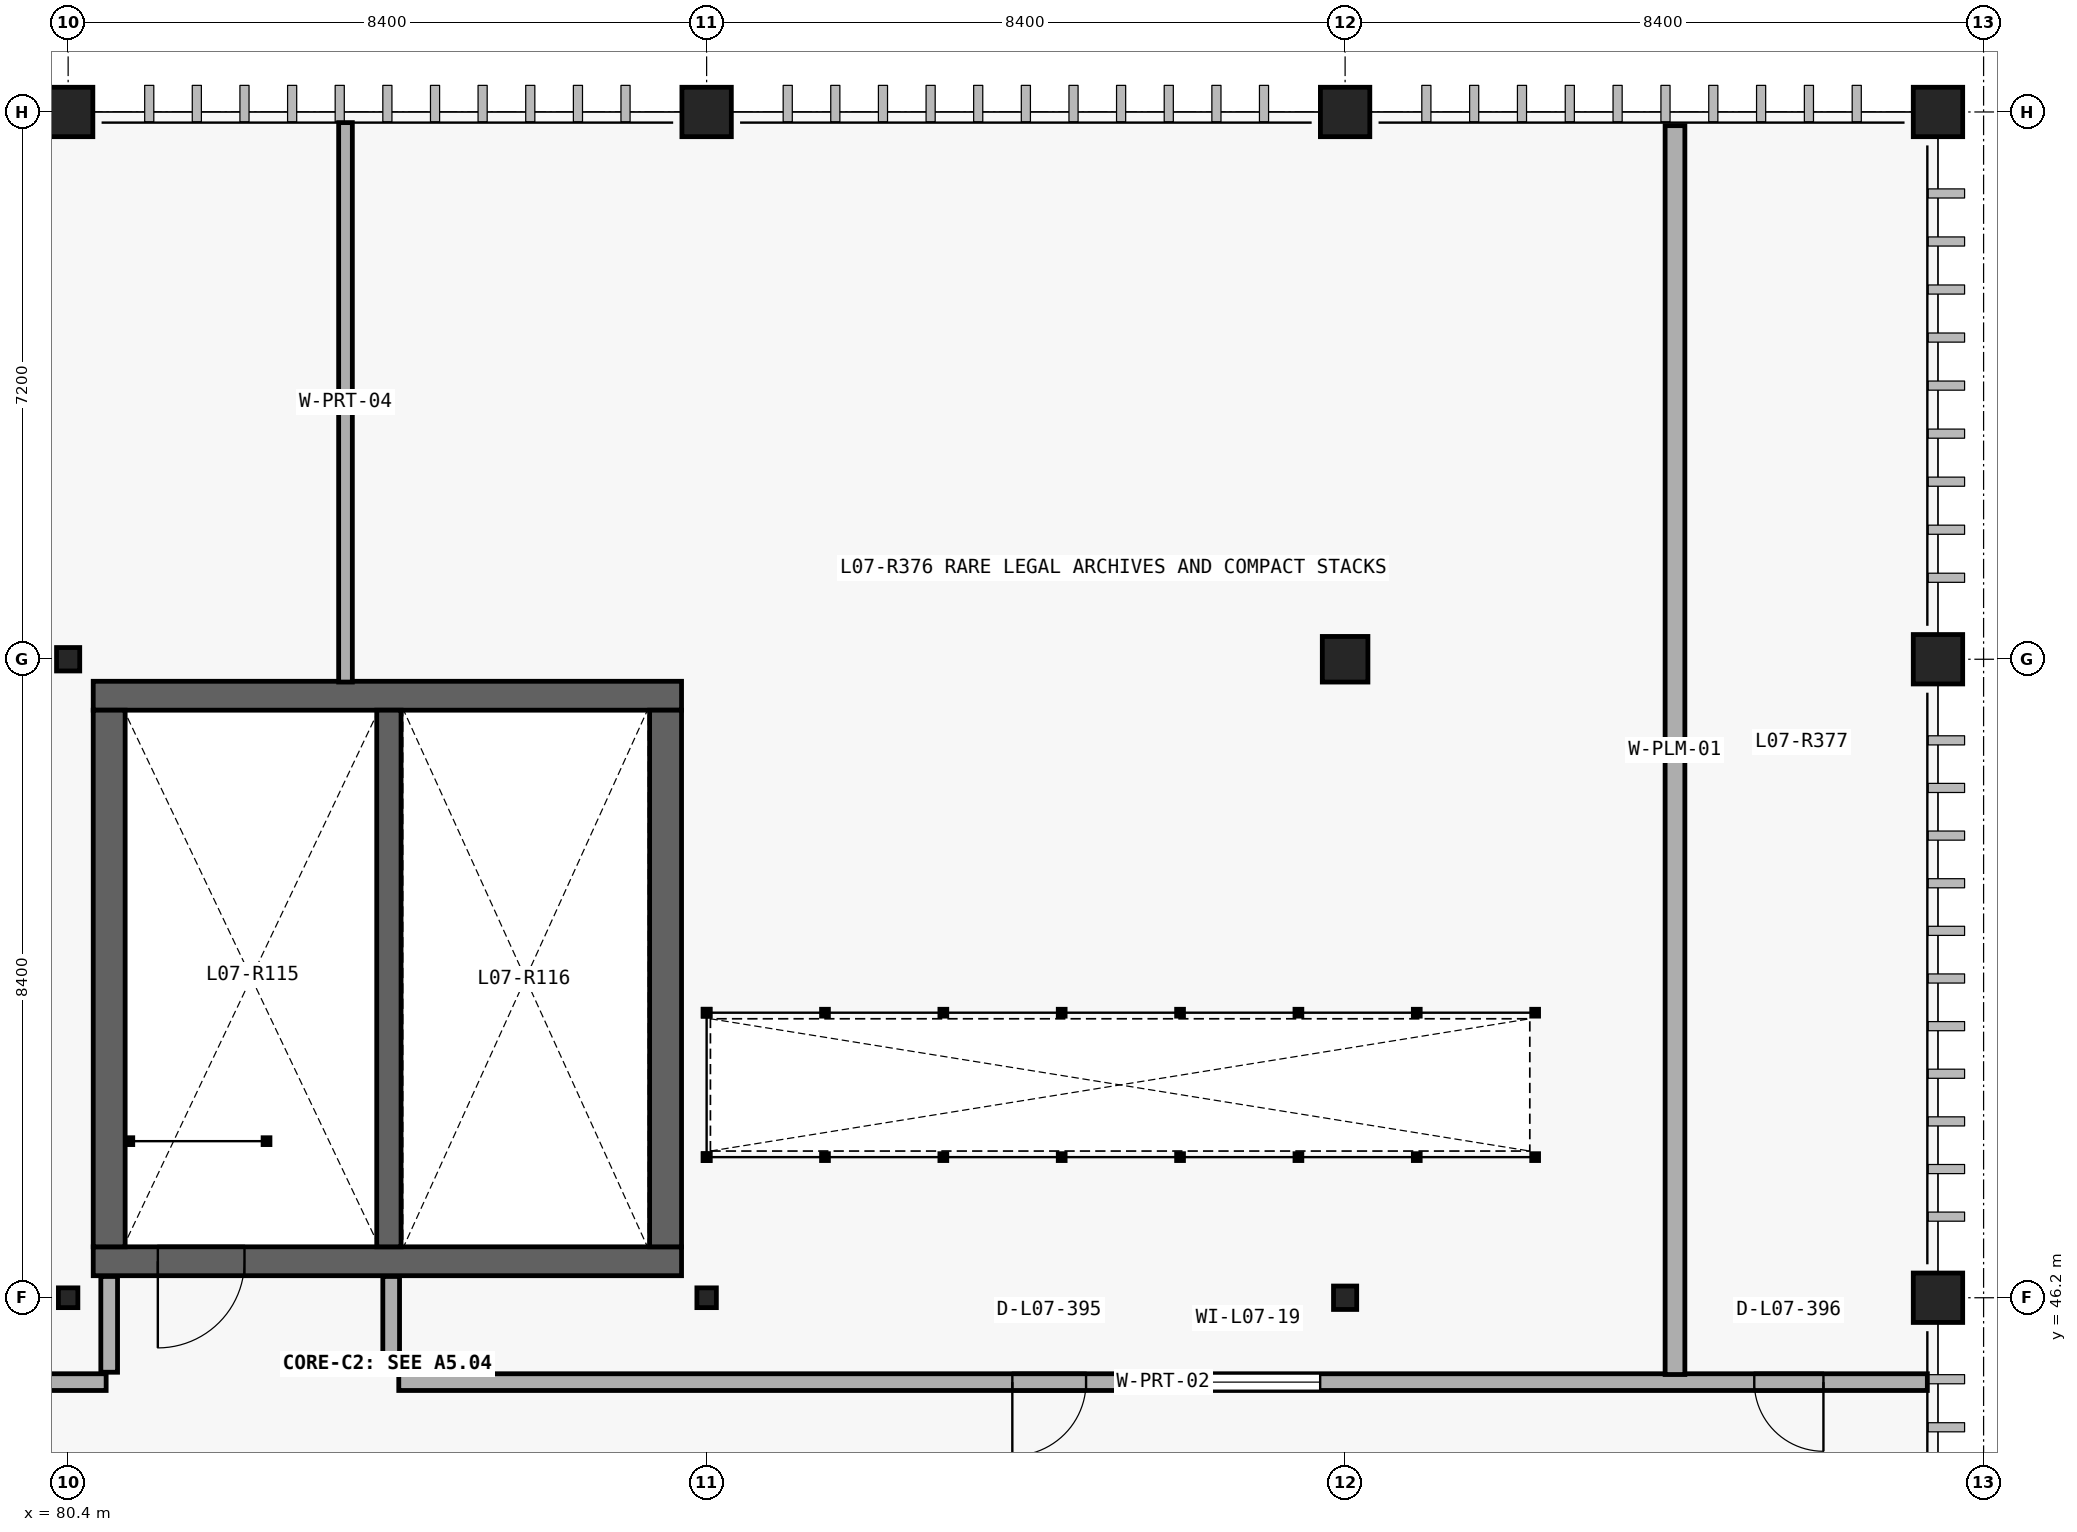
"""IFC4 building model, lengths in metres.
Left out: names, types, materials, properties, quantities, classifications, styles, units other than length and angle.
Written with IfcOpenShell. Run it as: python <this file> out.ifc"""

import sys

from ifc_helpers import new_model, si_unit, direction, frame, frame_2d, origin_with_axes, origin_2d_with_axis, place, context, subcontext, project, spatial, rectangle, circle, i_section, extrude, element, fill, save


model = new_model("IFC4")
c1 = context("Model", 3, precision=1e-05, world=origin_with_axes(), true_north=direction((0.0, 1.0)))
c2 = subcontext(c1, "Body", "Model", "MODEL_VIEW")
j1 = project(units=[si_unit("LENGTHUNIT", "METRE"), si_unit("PLANEANGLEUNIT", "RADIAN")], contexts=[c1])
p1 = place(None, origin_with_axes())
s1 = spatial("IfcSite", under=j1, at=p1, CompositionType="ELEMENT")
p2 = place(p1, origin_with_axes())
s2 = spatial("IfcBuilding", under=s1, at=p2, CompositionType="ELEMENT")
p3 = place(p2, frame((0.0, 0.0, 34.5), z_axis=(0.0, 0.0, 1.0), x_axis=(1.0, 0.0, 0.0)))
s3 = spatial("IfcBuildingStorey", under=s2, at=p3, CompositionType="ELEMENT", Elevation=34.5)
p4 = place(None, frame((80.73, 46.68, 34.5), z_axis=(0.0, 0.0, 1.0), x_axis=(1.0, 0.0, 0.0)))
e1 = element("IfcWall", 1, at=p4, inside=s3, PredefinedType="SHEAR", context=c2, shape_type="SweptSolid", body=[
    extrude(rectangle(XDim=7.74, YDim=0.38, at=frame_2d((3.87, 0.0), x_axis=(1.0, 0.0))), origin_with_axes(), (0.0, 0.0, 1.0), 4.5),
])
p5 = place(None, frame((82.15, 46.68, 34.5), z_axis=(0.0, 0.0, 1.0), x_axis=(1.0, 0.0, 0.0)))
e2 = element("IfcOpeningElement", 2, at=p5, cuts=e1, PredefinedType="OPENING", context=c2, shape_type="SweptSolid", body=[
    extrude(rectangle(XDim=1.14, YDim=2.18, at=frame_2d((0.0, 1.09), x_axis=(1.0, 0.0))), frame((0.0, 0.2, 0.0), z_axis=(0.0, -1.0, 0.0), x_axis=(1.0, 0.0, 0.0)), (0.0, 0.0, 1.0), 0.4),
])
p6 = place(None, frame((88.47, 54.12, 34.5), z_axis=(0.0, 0.0, 1.0), x_axis=(-1.0, 0.0, 0.0)))
e3 = element("IfcWall", 3, at=p6, inside=s3, PredefinedType="SHEAR", context=c2, shape_type="SweptSolid", body=[
    extrude(rectangle(XDim=7.74, YDim=0.38, at=frame_2d((3.87, 0.0), x_axis=(1.0, 0.0))), origin_with_axes(), (0.0, 0.0, 1.0), 4.5),
])
for number, where, z_axis, x_axis in (
    (4, (88.26, 46.87, 34.5), (0.0, 0.0, 1.0), (0.0, 1.0, 0.0)),
    (5, (80.94, 53.93, 34.5), (0.0, 0.0, 1.0), (0.0, -1.0, 0.0)),
):
    element("IfcWall", number, at=place(None, frame(where, z_axis=z_axis, x_axis=x_axis)), inside=s3, PredefinedType="SHEAR", context=c2, shape_type="SweptSolid", body=[
        extrude(rectangle(XDim=7.06, YDim=0.42, at=frame_2d((3.53, 0.0), x_axis=(1.0, 0.0))), origin_with_axes(), (0.0, 0.0, 1.0), 4.5),
    ])
p7 = place(None, frame((84.62, 46.87, 34.5), z_axis=(0.0, 0.0, 1.0), x_axis=(0.0, 1.0, 0.0)))
e6 = element("IfcWall", 6, at=p7, inside=s3, PredefinedType="SHEAR", context=c2, shape_type="SweptSolid", body=[
    extrude(rectangle(XDim=7.06, YDim=0.32, at=frame_2d((3.53, 0.0), x_axis=(1.0, 0.0))), origin_with_axes(), (0.0, 0.0, 1.0), 4.5),
])
for number, where, z_axis, x_axis in (
    (7, (80.94, 45.22, 34.5), (0.0, 0.0, 1.0), (0.0, 1.0, 0.0)),
    (8, (84.65, 45.22, 34.5), (0.0, 0.0, 1.0), (0.0, 1.0, 0.0)),
):
    element("IfcWall", number, at=place(None, frame(where, z_axis=z_axis, x_axis=x_axis)), inside=s3, PredefinedType="PARTITIONING", context=c2, shape_type="SweptSolid", body=[
        extrude(rectangle(XDim=1.26, YDim=0.22, at=frame_2d((0.63, 0.0), x_axis=(1.0, 0.0))), origin_with_axes(), (0.0, 0.0, 1.0), 4.14),
    ])
p8 = place(None, frame((66.755, 45.09, 34.5), z_axis=(0.0, 0.0, 1.0), x_axis=(1.0, 0.0, 0.0)))
e9 = element("IfcWall", 9, at=p8, inside=s3, PredefinedType="PARTITIONING", context=c2, shape_type="SweptSolid", body=[
    extrude(rectangle(XDim=14.145, YDim=0.22, at=frame_2d((7.072, 0.0), x_axis=(1.0, 0.0))), origin_with_axes(), (0.0, 0.0, 1.0), 4.14),
])
p9 = place(None, frame((73.828, 45.09, 34.5), z_axis=(0.0, 0.0, 1.0), x_axis=(1.0, 0.0, 0.0)))
e10 = element("IfcOpeningElement", 10, at=p9, cuts=e9, PredefinedType="OPENING", context=c2, shape_type="SweptSolid", body=[
    extrude(rectangle(XDim=0.97, YDim=2.26, at=frame_2d((0.0, 1.13), x_axis=(1.0, 0.0))), frame((0.0, 0.12, 0.0), z_axis=(0.0, -1.0, 0.0), x_axis=(1.0, 0.0, 0.0)), (0.0, 0.0, 1.0), 0.24),
])
p10 = place(None, frame((77.318, 45.09, 35.55), z_axis=(0.0, 0.0, 1.0), x_axis=(1.0, 0.0, 0.0)))
e11 = element("IfcOpeningElement", 11, at=p10, cuts=e9, PredefinedType="OPENING", context=c2, shape_type="SweptSolid", body=[
    extrude(rectangle(XDim=1.55, YDim=1.35, at=frame_2d((0.0, 0.675), x_axis=(1.0, 0.0))), frame((0.0, 0.12, 0.0), z_axis=(0.0, -1.0, 0.0), x_axis=(1.0, 0.0, 0.0)), (0.0, 0.0, 1.0), 0.24),
])
p11 = place(None, frame((84.75, 45.09, 34.5), z_axis=(0.0, 0.0, 1.0), x_axis=(1.0, 0.0, 0.0)))
e12 = element("IfcWall", 12, at=p11, inside=s3, PredefinedType="PARTITIONING", context=c2, shape_type="SweptSolid", body=[
    extrude(rectangle(XDim=20.11, YDim=0.22, at=frame_2d((10.055, 0.0), x_axis=(1.0, 0.0))), origin_with_axes(), (0.0, 0.0, 1.0), 4.14),
])
p12 = place(None, frame((93.307, 45.09, 34.5), z_axis=(0.0, 0.0, 1.0), x_axis=(1.0, 0.0, 0.0)))
e13 = element("IfcOpeningElement", 13, at=p12, cuts=e12, PredefinedType="OPENING", context=c2, shape_type="SweptSolid", body=[
    extrude(rectangle(XDim=0.97, YDim=2.26, at=frame_2d((0.0, 1.13), x_axis=(1.0, 0.0))), frame((0.0, 0.12, 0.0), z_axis=(0.0, -1.0, 0.0), x_axis=(1.0, 0.0, 0.0)), (0.0, 0.0, 1.0), 0.24),
])
p13 = place(None, frame((103.038, 45.09, 34.5), z_axis=(0.0, 0.0, 1.0), x_axis=(1.0, 0.0, 0.0)))
e14 = element("IfcOpeningElement", 14, at=p13, cuts=e12, PredefinedType="OPENING", context=c2, shape_type="SweptSolid", body=[
    extrude(rectangle(XDim=0.91, YDim=2.12, at=frame_2d((0.0, 1.06), x_axis=(1.0, 0.0))), frame((0.0, 0.12, 0.0), z_axis=(0.0, -1.0, 0.0), x_axis=(1.0, 0.0, 0.0)), (0.0, 0.0, 1.0), 0.24),
])
p14 = place(None, frame((95.922, 45.09, 35.55), z_axis=(0.0, 0.0, 1.0), x_axis=(1.0, 0.0, 0.0)))
e15 = element("IfcOpeningElement", 15, at=p14, cuts=e12, PredefinedType="OPENING", context=c2, shape_type="SweptSolid", body=[
    extrude(rectangle(XDim=1.9, YDim=1.5, at=frame_2d((0.0, 0.75), x_axis=(1.0, 0.0))), frame((0.0, 0.12, 0.0), z_axis=(0.0, -1.0, 0.0), x_axis=(1.0, 0.0, 0.0)), (0.0, 0.0, 1.0), 0.24),
])
p15 = place(None, frame((101.54, 45.19, 34.5), z_axis=(0.0, 0.0, 1.0), x_axis=(0.0, 1.0, 0.0)))
e16 = element("IfcWall", 16, at=p15, inside=s3, PredefinedType="PLUMBINGWALL", context=c2, shape_type="SweptSolid", body=[
    extrude(rectangle(XDim=16.43, YDim=0.26, at=frame_2d((8.215, 0.0), x_axis=(1.0, 0.0))), origin_with_axes(), (0.0, 0.0, 1.0), 4.14),
])
p16 = place(None, frame((84.049, 54.3, 34.5), z_axis=(0.0, 0.0, 1.0), x_axis=(0.0, 1.0, 0.0)))
e17 = element("IfcWall", 17, at=p16, inside=s3, PredefinedType="PARTITIONING", context=c2, shape_type="SweptSolid", body=[
    extrude(rectangle(XDim=7.36, YDim=0.18, at=frame_2d((3.68, 0.0), x_axis=(1.0, 0.0))), origin_with_axes(), (0.0, 0.0, 1.0), 4.14),
])
p17 = place(None, frame((80.4, 46.2, 34.5), z_axis=(0.0, 0.0, 1.0), x_axis=(1.0, 0.0, 0.0)))
e18 = element("IfcColumn", 18, at=p17, inside=s3, PredefinedType="COLUMN", context=c2, shape_type="SweptSolid", body=[
    extrude(i_section(OverallWidth=0.256, OverallDepth=0.26, WebThickness=0.011, FlangeThickness=0.017, at=origin_2d_with_axis()), origin_with_axes(), (0.0, 0.0, 1.0), 4.5),
])
p18 = place(None, frame((80.4, 54.6, 34.5), z_axis=(0.0, 0.0, 1.0), x_axis=(1.0, 0.0, 0.0)))
e19 = element("IfcColumn", 19, at=p18, inside=s3, PredefinedType="COLUMN", context=c2, shape_type="SweptSolid", body=[
    extrude(i_section(OverallWidth=0.305, OverallDepth=0.308, WebThickness=0.01, FlangeThickness=0.015, at=origin_2d_with_axis()), origin_with_axes(), (0.0, 0.0, 1.0), 4.5),
])
p19 = place(None, frame((80.4, 61.8, 34.5), z_axis=(0.0, 0.0, 1.0), x_axis=(1.0, 0.0, 0.0)))
e20 = element("IfcColumn", 20, at=p19, inside=s3, PredefinedType="COLUMN", context=c2, shape_type="SweptSolid", body=[
    extrude(circle(Radius=0.325, at=origin_2d_with_axis()), origin_with_axes(), (0.0, 0.0, 1.0), 4.5),
])
p20 = place(None, frame((88.8, 46.2, 34.5), z_axis=(0.0, 0.0, 1.0), x_axis=(1.0, 0.0, 0.0)))
e21 = element("IfcColumn", 21, at=p20, inside=s3, PredefinedType="COLUMN", context=c2, shape_type="SweptSolid", body=[
    extrude(i_section(OverallWidth=0.256, OverallDepth=0.26, WebThickness=0.011, FlangeThickness=0.017, at=origin_2d_with_axis()), origin_with_axes(), (0.0, 0.0, 1.0), 4.5),
])
p21 = place(None, frame((88.8, 61.8, 34.5), z_axis=(0.0, 0.0, 1.0), x_axis=(1.0, 0.0, 0.0)))
e22 = element("IfcColumn", 22, at=p21, inside=s3, PredefinedType="COLUMN", context=c2, shape_type="SweptSolid", body=[
    extrude(circle(Radius=0.325, at=origin_2d_with_axis()), origin_with_axes(), (0.0, 0.0, 1.0), 4.5),
])
p22 = place(None, frame((97.2, 46.2, 34.5), z_axis=(0.0, 0.0, 1.0), x_axis=(1.0, 0.0, 0.0)))
e23 = element("IfcColumn", 23, at=p22, inside=s3, PredefinedType="COLUMN", context=c2, shape_type="SweptSolid", body=[
    extrude(i_section(OverallWidth=0.305, OverallDepth=0.308, WebThickness=0.01, FlangeThickness=0.015, at=origin_2d_with_axis()), origin_with_axes(), (0.0, 0.0, 1.0), 4.5),
])
p23 = place(None, frame((97.2, 54.6, 34.5), z_axis=(0.0, 0.0, 1.0), x_axis=(1.0, 0.0, 0.0)))
e24 = element("IfcColumn", 24, at=p23, inside=s3, PredefinedType="COLUMN", context=c2, shape_type="SweptSolid", body=[
    extrude(rectangle(XDim=0.6, YDim=0.6, at=origin_2d_with_axis()), origin_with_axes(), (0.0, 0.0, 1.0), 4.5),
])
for number, where, z_axis, x_axis in (
    (25, (97.2, 61.8, 34.5), (0.0, 0.0, 1.0), (1.0, 0.0, 0.0)),
    (26, (105.0, 46.2, 34.5), (0.0, 0.0, 1.0), (1.0, 0.0, 0.0)),
    (27, (105.0, 54.6, 34.5), (0.0, 0.0, 1.0), (1.0, 0.0, 0.0)),
    (28, (105.0, 61.8, 34.5), (0.0, 0.0, 1.0), (1.0, 0.0, 0.0)),
):
    element("IfcColumn", number, at=place(None, frame(where, z_axis=z_axis, x_axis=x_axis)), inside=s3, PredefinedType="COLUMN", context=c2, shape_type="SweptSolid", body=[
        extrude(circle(Radius=0.325, at=origin_2d_with_axis()), origin_with_axes(), (0.0, 0.0, 1.0), 4.5),
    ])
p24 = place(None, frame((82.15, 46.68, 34.5), z_axis=(0.0, 0.0, 1.0), x_axis=(-1.0, 0.0, 0.0)))
e29 = element("IfcDoor", 29, at=p24, inside=s3, OperationType="SINGLE_SWING_LEFT", PredefinedType="DOOR", context=c2, shape_type="SweptSolid", body=[
    extrude(rectangle(XDim=1.14, YDim=2.18, at=frame_2d((0.0, 1.09), x_axis=(1.0, 0.0))), frame((0.0, 0.04, 0.0), z_axis=(0.0, -1.0, 0.0), x_axis=(1.0, 0.0, 0.0)), (0.0, 0.0, 1.0), 0.08),
])
fill(e2, e29)
p25 = place(None, frame((93.307, 45.09, 34.5), z_axis=(0.0, 0.0, 1.0), x_axis=(-1.0, 0.0, 0.0)))
e30 = element("IfcDoor", 30, at=p25, inside=s3, OperationType="SINGLE_SWING_LEFT", PredefinedType="DOOR", context=c2, shape_type="SweptSolid", body=[
    extrude(rectangle(XDim=0.97, YDim=2.26, at=frame_2d((0.0, 1.13), x_axis=(1.0, 0.0))), frame((0.0, 0.04, 0.0), z_axis=(0.0, -1.0, 0.0), x_axis=(1.0, 0.0, 0.0)), (0.0, 0.0, 1.0), 0.08),
])
fill(e13, e30)
p26 = place(None, frame((103.038, 45.09, 34.5), z_axis=(0.0, 0.0, 1.0), x_axis=(-1.0, 0.0, 0.0)))
e31 = element("IfcDoor", 31, at=p26, inside=s3, OperationType="SINGLE_SWING_RIGHT", PredefinedType="DOOR", context=c2, shape_type="SweptSolid", body=[
    extrude(rectangle(XDim=0.91, YDim=2.12, at=frame_2d((0.0, 1.06), x_axis=(1.0, 0.0))), frame((0.0, 0.04, 0.0), z_axis=(0.0, -1.0, 0.0), x_axis=(1.0, 0.0, 0.0)), (0.0, 0.0, 1.0), 0.08),
])
fill(e14, e31)
p27 = place(None, frame((95.922, 45.09, 35.55), z_axis=(0.0, 0.0, 1.0), x_axis=(1.0, 0.0, 0.0)))
e32 = element("IfcWindow", 32, at=p27, inside=s3, PartitioningType="SINGLE_PANEL", PredefinedType="WINDOW", context=c2, shape_type="SweptSolid", body=[
    extrude(rectangle(XDim=1.9, YDim=1.5, at=frame_2d((0.0, 0.75), x_axis=(1.0, 0.0))), frame((0.0, 0.03, 0.0), z_axis=(0.0, -1.0, 0.0), x_axis=(1.0, 0.0, 0.0)), (0.0, 0.0, 1.0), 0.06),
])
fill(e15, e32)
save(model, sys.argv[1])
